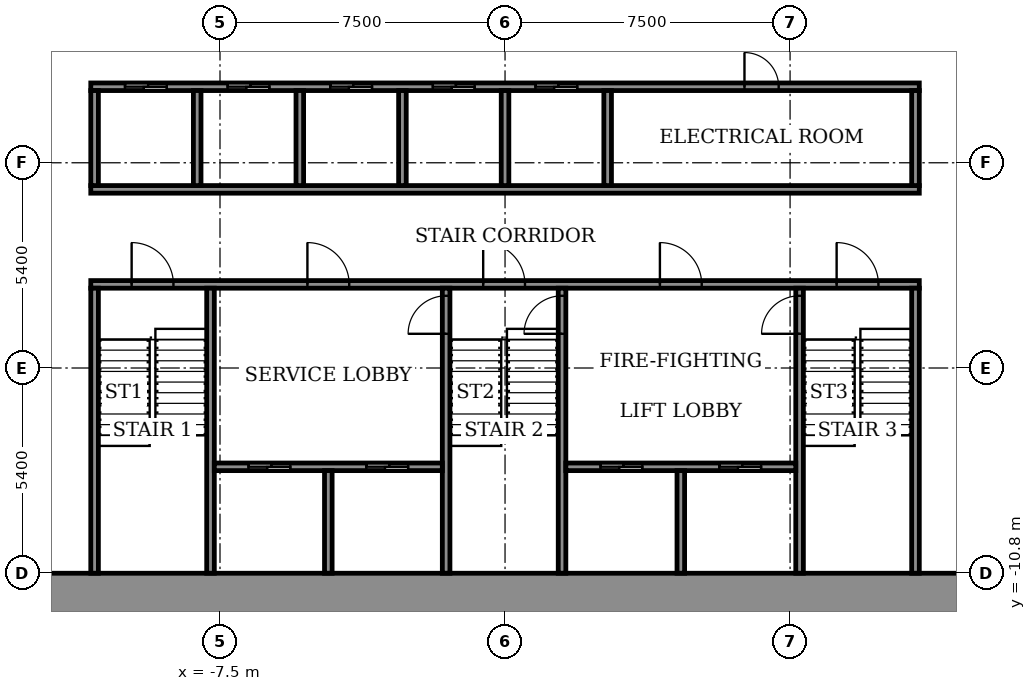
"""IFC4 building model, lengths in metres.
Left out: names, types, materials, properties, quantities, classifications, styles, units other than length and angle.
Written with IfcOpenShell. Run it as: python <this file> out.ifc"""

import sys

from ifc_helpers import new_model, si_unit, direction, frame, frame_2d, origin, place, context, subcontext, project, spatial, rectangle, extrude, element, fill, save


model = new_model("IFC4")
c1 = context("Model", 3, precision=1e-05, world=origin(), true_north=direction((0.0, 1.0)))
c2 = subcontext(c1, "Body", "Model", "MODEL_VIEW")
j1 = project(units=[si_unit("LENGTHUNIT", "METRE"), si_unit("PLANEANGLEUNIT", "RADIAN")], contexts=[c1])
p1 = place(None, origin())
s1 = spatial("IfcSite", under=j1, at=p1, CompositionType="ELEMENT")
p2 = place(p1, origin())
s2 = spatial("IfcBuilding", under=s1, at=p2, CompositionType="ELEMENT")
p3 = place(p2, frame((0.0, 0.0, 48.5)))
s3 = spatial("IfcBuildingStorey", under=s2, at=p3, CompositionType="ELEMENT", Elevation=48.5)
p4 = place(p3, frame((-14.9, -11.35, 0.0), z_axis=(0.0, 0.0, 1.0), x_axis=(1.0, 0.0, 0.0)))
e1 = element("IfcWall", 1, at=p4, inside=s3, PredefinedType="SHEAR", context=c2, shape_type="SweptSolid", body=[
    extrude(rectangle(XDim=29.8, YDim=1.1, at=frame_2d((14.9, 0.0))), origin(), (0.0, 0.0, 1.0), 3.6),
])
p5 = place(p3, frame((-10.9, -3.2, 0.0), z_axis=(0.0, 0.0, 1.0), x_axis=(1.0, 0.0, 0.0)))
e2 = element("IfcWall", 2, at=p5, inside=s3, PredefinedType="SHEAR", context=c2, shape_type="SweptSolid", body=[
    extrude(rectangle(XDim=21.8, YDim=0.2, at=frame_2d((10.9, 0.0))), origin(), (0.0, 0.0, 1.0), 3.05),
])
p6 = place(p5, frame((1.075, 0.0, 0.0)))
e3 = element("IfcOpeningElement", 3, at=p6, cuts=e2, PredefinedType="OPENING", context=c2, shape_type="SweptSolid", body=[
    extrude(rectangle(XDim=1.1, YDim=2.1, at=frame_2d((0.55, 1.05))), frame((0.0, 0.11, 0.0), z_axis=(0.0, -1.0, 0.0), x_axis=(1.0, 0.0, 0.0)), (0.0, 0.0, 1.0), 0.22),
])
p7 = place(p5, frame((10.325, 0.0, 0.0)))
e4 = element("IfcOpeningElement", 4, at=p7, cuts=e2, PredefinedType="OPENING", context=c2, shape_type="SweptSolid", body=[
    extrude(rectangle(XDim=1.1, YDim=2.1, at=frame_2d((0.55, 1.05))), frame((0.0, 0.11, 0.0), z_axis=(0.0, -1.0, 0.0), x_axis=(1.0, 0.0, 0.0)), (0.0, 0.0, 1.0), 0.22),
])
p8 = place(p5, frame((19.625, 0.0, 0.0)))
e5 = element("IfcOpeningElement", 5, at=p8, cuts=e2, PredefinedType="OPENING", context=c2, shape_type="SweptSolid", body=[
    extrude(rectangle(XDim=1.1, YDim=2.1, at=frame_2d((0.55, 1.05))), frame((0.0, 0.11, 0.0), z_axis=(0.0, -1.0, 0.0), x_axis=(1.0, 0.0, 0.0)), (0.0, 0.0, 1.0), 0.22),
])
p9 = place(p5, frame((5.7, 0.0, 0.0)))
e6 = element("IfcOpeningElement", 6, at=p9, cuts=e2, PredefinedType="OPENING", context=c2, shape_type="SweptSolid", body=[
    extrude(rectangle(XDim=1.1, YDim=2.1, at=frame_2d((0.55, 1.05))), frame((0.0, 0.11, 0.0), z_axis=(0.0, -1.0, 0.0), x_axis=(1.0, 0.0, 0.0)), (0.0, 0.0, 1.0), 0.22),
])
p10 = place(p5, frame((14.975, 0.0, 0.0)))
e7 = element("IfcOpeningElement", 7, at=p10, cuts=e2, PredefinedType="OPENING", context=c2, shape_type="SweptSolid", body=[
    extrude(rectangle(XDim=1.1, YDim=2.1, at=frame_2d((0.55, 1.05))), frame((0.0, 0.11, 0.0), z_axis=(0.0, -1.0, 0.0), x_axis=(1.0, 0.0, 0.0)), (0.0, 0.0, 1.0), 0.22),
])
p11 = place(p3, frame((-10.9, -0.7, 0.0), z_axis=(0.0, 0.0, 1.0), x_axis=(1.0, 0.0, 0.0)))
e8 = element("IfcWall", 8, at=p11, inside=s3, PredefinedType="SHEAR", context=c2, shape_type="SweptSolid", body=[
    extrude(rectangle(XDim=21.8, YDim=0.2, at=frame_2d((10.9, 0.0))), origin(), (0.0, 0.0, 1.0), 3.05),
])
p12 = place(p3, frame((-10.9, 2.0, 0.0), z_axis=(0.0, 0.0, 1.0), x_axis=(1.0, 0.0, 0.0)))
e9 = element("IfcWall", 9, at=p12, inside=s3, PredefinedType="SHEAR", context=c2, shape_type="SweptSolid", body=[
    extrude(rectangle(XDim=21.8, YDim=0.2, at=frame_2d((10.9, 0.0))), origin(), (0.0, 0.0, 1.0), 3.05),
])
p13 = place(p12, frame((0.9, 0.0, 0.0)))
e10 = element("IfcOpeningElement", 10, at=p13, cuts=e9, PredefinedType="OPENING", context=c2, shape_type="SweptSolid", body=[
    extrude(rectangle(XDim=1.1, YDim=2.1, at=frame_2d((0.55, 1.05))), frame((0.0, 0.11, 0.0), z_axis=(0.0, -1.0, 0.0), x_axis=(1.0, 0.0, 0.0)), (0.0, 0.0, 1.0), 0.22),
])
p14 = place(p12, frame((3.6, 0.0, 0.0)))
e11 = element("IfcOpeningElement", 11, at=p14, cuts=e9, PredefinedType="OPENING", context=c2, shape_type="SweptSolid", body=[
    extrude(rectangle(XDim=1.1, YDim=2.1, at=frame_2d((0.55, 1.05))), frame((0.0, 0.11, 0.0), z_axis=(0.0, -1.0, 0.0), x_axis=(1.0, 0.0, 0.0)), (0.0, 0.0, 1.0), 0.22),
])
p15 = place(p12, frame((6.3, 0.0, 0.0)))
e12 = element("IfcOpeningElement", 12, at=p15, cuts=e9, PredefinedType="OPENING", context=c2, shape_type="SweptSolid", body=[
    extrude(rectangle(XDim=1.1, YDim=2.1, at=frame_2d((0.55, 1.05))), frame((0.0, 0.11, 0.0), z_axis=(0.0, -1.0, 0.0), x_axis=(1.0, 0.0, 0.0)), (0.0, 0.0, 1.0), 0.22),
])
p16 = place(p12, frame((9.0, 0.0, 0.0)))
e13 = element("IfcOpeningElement", 13, at=p16, cuts=e9, PredefinedType="OPENING", context=c2, shape_type="SweptSolid", body=[
    extrude(rectangle(XDim=1.1, YDim=2.1, at=frame_2d((0.55, 1.05))), frame((0.0, 0.11, 0.0), z_axis=(0.0, -1.0, 0.0), x_axis=(1.0, 0.0, 0.0)), (0.0, 0.0, 1.0), 0.22),
])
p17 = place(p12, frame((11.7, 0.0, 0.0)))
e14 = element("IfcOpeningElement", 14, at=p17, cuts=e9, PredefinedType="OPENING", context=c2, shape_type="SweptSolid", body=[
    extrude(rectangle(XDim=1.1, YDim=2.1, at=frame_2d((0.55, 1.05))), frame((0.0, 0.11, 0.0), z_axis=(0.0, -1.0, 0.0), x_axis=(1.0, 0.0, 0.0)), (0.0, 0.0, 1.0), 0.22),
])
p18 = place(p12, frame((17.2, 0.0, 0.0)))
e15 = element("IfcOpeningElement", 15, at=p18, cuts=e9, PredefinedType="OPENING", context=c2, shape_type="SweptSolid", body=[
    extrude(rectangle(XDim=0.9, YDim=2.1, at=frame_2d((0.45, 1.05))), frame((0.0, 0.11, 0.0), z_axis=(0.0, -1.0, 0.0), x_axis=(1.0, 0.0, 0.0)), (0.0, 0.0, 1.0), 0.22),
])
for number, where, z_axis, x_axis in (
    (16, (-10.8, -10.8, 0.0), (0.0, 0.0, 1.0), (0.0, 1.0, 0.0)),
    (17, (-7.75, -10.8, 0.0), (0.0, 0.0, 1.0), (0.0, 1.0, 0.0)),
):
    element("IfcWall", number, at=place(p3, frame(where, z_axis=z_axis, x_axis=x_axis)), inside=s3, PredefinedType="SHEAR", context=c2, shape_type="SweptSolid", body=[
        extrude(rectangle(XDim=7.5, YDim=0.2, at=frame_2d((3.75, 0.0))), origin(), (0.0, 0.0, 1.0), 3.05),
    ])
p19 = place(p3, frame((-1.55, -10.8, 0.0), z_axis=(0.0, 0.0, 1.0), x_axis=(0.0, 1.0, 0.0)))
e18 = element("IfcWall", 18, at=p19, inside=s3, PredefinedType="SHEAR", context=c2, shape_type="SweptSolid", body=[
    extrude(rectangle(XDim=7.5, YDim=0.2, at=frame_2d((3.75, 0.0))), origin(), (0.0, 0.0, 1.0), 3.05),
])
p20 = place(p19, frame((6.3, 0.0, 0.0)))
e19 = element("IfcOpeningElement", 19, at=p20, cuts=e18, PredefinedType="OPENING", context=c2, shape_type="SweptSolid", body=[
    extrude(rectangle(XDim=1.0, YDim=2.1, at=frame_2d((0.5, 1.05))), frame((0.0, 0.11, 0.0), z_axis=(0.0, -1.0, 0.0), x_axis=(1.0, 0.0, 0.0)), (0.0, 0.0, 1.0), 0.22),
])
p21 = place(p3, frame((1.5, -10.8, 0.0), z_axis=(0.0, 0.0, 1.0), x_axis=(0.0, 1.0, 0.0)))
e20 = element("IfcWall", 20, at=p21, inside=s3, PredefinedType="SHEAR", context=c2, shape_type="SweptSolid", body=[
    extrude(rectangle(XDim=7.5, YDim=0.2, at=frame_2d((3.75, 0.0))), origin(), (0.0, 0.0, 1.0), 3.05),
])
p22 = place(p21, frame((6.3, 0.0, 0.0)))
e21 = element("IfcOpeningElement", 21, at=p22, cuts=e20, PredefinedType="OPENING", context=c2, shape_type="SweptSolid", body=[
    extrude(rectangle(XDim=1.0, YDim=2.1, at=frame_2d((0.5, 1.05))), frame((0.0, 0.11, 0.0), z_axis=(0.0, -1.0, 0.0), x_axis=(1.0, 0.0, 0.0)), (0.0, 0.0, 1.0), 0.22),
])
p23 = place(p3, frame((7.75, -10.8, 0.0), z_axis=(0.0, 0.0, 1.0), x_axis=(0.0, 1.0, 0.0)))
e22 = element("IfcWall", 22, at=p23, inside=s3, PredefinedType="SHEAR", context=c2, shape_type="SweptSolid", body=[
    extrude(rectangle(XDim=7.5, YDim=0.2, at=frame_2d((3.75, 0.0))), origin(), (0.0, 0.0, 1.0), 3.05),
])
p24 = place(p23, frame((6.3, 0.0, 0.0)))
e23 = element("IfcOpeningElement", 23, at=p24, cuts=e22, PredefinedType="OPENING", context=c2, shape_type="SweptSolid", body=[
    extrude(rectangle(XDim=1.0, YDim=2.1, at=frame_2d((0.5, 1.05))), frame((0.0, 0.11, 0.0), z_axis=(0.0, -1.0, 0.0), x_axis=(1.0, 0.0, 0.0)), (0.0, 0.0, 1.0), 0.22),
])
p25 = place(p3, frame((10.8, -10.8, 0.0), z_axis=(0.0, 0.0, 1.0), x_axis=(0.0, 1.0, 0.0)))
e24 = element("IfcWall", 24, at=p25, inside=s3, PredefinedType="SHEAR", context=c2, shape_type="SweptSolid", body=[
    extrude(rectangle(XDim=7.5, YDim=0.2, at=frame_2d((3.75, 0.0))), origin(), (0.0, 0.0, 1.0), 3.05),
])
p26 = place(p3, frame((-7.65, -8.0, 0.0), z_axis=(0.0, 0.0, 1.0), x_axis=(1.0, 0.0, 0.0)))
e25 = element("IfcWall", 25, at=p26, inside=s3, PredefinedType="SHEAR", context=c2, shape_type="SweptSolid", body=[
    extrude(rectangle(XDim=6.0, YDim=0.2, at=frame_2d((3.0, 0.0))), origin(), (0.0, 0.0, 1.0), 3.05),
])
p27 = place(p26, frame((0.9, 0.0, 0.0)))
e26 = element("IfcOpeningElement", 26, at=p27, cuts=e25, PredefinedType="OPENING", context=c2, shape_type="SweptSolid", body=[
    extrude(rectangle(XDim=1.1, YDim=2.1, at=frame_2d((0.55, 1.05))), frame((0.0, 0.11, 0.0), z_axis=(0.0, -1.0, 0.0), x_axis=(1.0, 0.0, 0.0)), (0.0, 0.0, 1.0), 0.22),
])
p28 = place(p26, frame((4.0, 0.0, 0.0)))
e27 = element("IfcOpeningElement", 27, at=p28, cuts=e25, PredefinedType="OPENING", context=c2, shape_type="SweptSolid", body=[
    extrude(rectangle(XDim=1.1, YDim=2.1, at=frame_2d((0.55, 1.05))), frame((0.0, 0.11, 0.0), z_axis=(0.0, -1.0, 0.0), x_axis=(1.0, 0.0, 0.0)), (0.0, 0.0, 1.0), 0.22),
])
p29 = place(p3, frame((-4.65, -10.8, 0.0), z_axis=(0.0, 0.0, 1.0), x_axis=(0.0, 1.0, 0.0)))
e28 = element("IfcWall", 28, at=p29, inside=s3, PredefinedType="SHEAR", context=c2, shape_type="SweptSolid", body=[
    extrude(rectangle(XDim=2.7, YDim=0.2, at=frame_2d((1.35, 0.0))), origin(), (0.0, 0.0, 1.0), 3.05),
])
p30 = place(p3, frame((1.6, -8.0, 0.0), z_axis=(0.0, 0.0, 1.0), x_axis=(1.0, 0.0, 0.0)))
e29 = element("IfcWall", 29, at=p30, inside=s3, PredefinedType="SHEAR", context=c2, shape_type="SweptSolid", body=[
    extrude(rectangle(XDim=6.05, YDim=0.2, at=frame_2d((3.025, 0.0))), origin(), (0.0, 0.0, 1.0), 3.05),
])
p31 = place(p30, frame((0.913, 0.0, 0.0)))
e30 = element("IfcOpeningElement", 30, at=p31, cuts=e29, PredefinedType="OPENING", context=c2, shape_type="SweptSolid", body=[
    extrude(rectangle(XDim=1.1, YDim=2.1, at=frame_2d((0.55, 1.05))), frame((0.0, 0.11, 0.0), z_axis=(0.0, -1.0, 0.0), x_axis=(1.0, 0.0, 0.0)), (0.0, 0.0, 1.0), 0.22),
])
p32 = place(p30, frame((4.038, 0.0, 0.0)))
e31 = element("IfcOpeningElement", 31, at=p32, cuts=e29, PredefinedType="OPENING", context=c2, shape_type="SweptSolid", body=[
    extrude(rectangle(XDim=1.1, YDim=2.1, at=frame_2d((0.55, 1.05))), frame((0.0, 0.11, 0.0), z_axis=(0.0, -1.0, 0.0), x_axis=(1.0, 0.0, 0.0)), (0.0, 0.0, 1.0), 0.22),
])
p33 = place(p3, frame((4.625, -10.8, 0.0), z_axis=(0.0, 0.0, 1.0), x_axis=(0.0, 1.0, 0.0)))
e32 = element("IfcWall", 32, at=p33, inside=s3, PredefinedType="SHEAR", context=c2, shape_type="SweptSolid", body=[
    extrude(rectangle(XDim=2.7, YDim=0.2, at=frame_2d((1.35, 0.0))), origin(), (0.0, 0.0, 1.0), 3.05),
])
for number, where, z_axis, x_axis in (
    (33, (-10.8, -0.6, 0.0), (0.0, 0.0, 1.0), (0.0, 1.0, 0.0)),
    (34, (-8.1, -0.6, 0.0), (0.0, 0.0, 1.0), (0.0, 1.0, 0.0)),
    (35, (-5.4, -0.6, 0.0), (0.0, 0.0, 1.0), (0.0, 1.0, 0.0)),
    (36, (-2.7, -0.6, 0.0), (0.0, 0.0, 1.0), (0.0, 1.0, 0.0)),
    (37, (0.0, -0.6, 0.0), (0.0, 0.0, 1.0), (0.0, 1.0, 0.0)),
    (38, (2.7, -0.6, 0.0), (0.0, 0.0, 1.0), (0.0, 1.0, 0.0)),
):
    element("IfcWall", number, at=place(p3, frame(where, z_axis=z_axis, x_axis=x_axis)), inside=s3, PredefinedType="SHEAR", context=c2, shape_type="SweptSolid", body=[
        extrude(rectangle(XDim=2.5, YDim=0.2, at=frame_2d((1.25, 0.0))), origin(), (0.0, 0.0, 1.0), 3.05),
    ])
p34 = place(p3, frame((10.8, -0.6, 0.0), z_axis=(0.0, 0.0, 1.0), x_axis=(0.0, 1.0, 0.0)))
e39 = element("IfcWall", 39, at=p34, inside=s3, PredefinedType="STANDARD", context=c2, shape_type="SweptSolid", body=[
    extrude(rectangle(XDim=2.5, YDim=0.2, at=frame_2d((1.25, 0.0))), origin(), (0.0, 0.0, 1.0), 3.05),
])
p35 = place(p13, origin())
e40 = element("IfcDoor", 40, at=p35, inside=s3, OperationType="SLIDING_TO_LEFT", PredefinedType="DOOR", context=c2, shape_type="SweptSolid", body=[
    extrude(rectangle(XDim=1.1, YDim=2.1, at=frame_2d((0.55, 1.05))), frame((0.0, 0.025, 0.0), z_axis=(0.0, -1.0, 0.0), x_axis=(1.0, 0.0, 0.0)), (0.0, 0.0, 1.0), 0.05),
])
fill(e10, e40)
p36 = place(p14, origin())
e41 = element("IfcDoor", 41, at=p36, inside=s3, OperationType="SLIDING_TO_LEFT", PredefinedType="DOOR", context=c2, shape_type="SweptSolid", body=[
    extrude(rectangle(XDim=1.1, YDim=2.1, at=frame_2d((0.55, 1.05))), frame((0.0, 0.025, 0.0), z_axis=(0.0, -1.0, 0.0), x_axis=(1.0, 0.0, 0.0)), (0.0, 0.0, 1.0), 0.05),
])
fill(e11, e41)
p37 = place(p15, origin())
e42 = element("IfcDoor", 42, at=p37, inside=s3, OperationType="SLIDING_TO_LEFT", PredefinedType="DOOR", context=c2, shape_type="SweptSolid", body=[
    extrude(rectangle(XDim=1.1, YDim=2.1, at=frame_2d((0.55, 1.05))), frame((0.0, 0.025, 0.0), z_axis=(0.0, -1.0, 0.0), x_axis=(1.0, 0.0, 0.0)), (0.0, 0.0, 1.0), 0.05),
])
fill(e12, e42)
p38 = place(p16, origin())
e43 = element("IfcDoor", 43, at=p38, inside=s3, OperationType="SLIDING_TO_LEFT", PredefinedType="DOOR", context=c2, shape_type="SweptSolid", body=[
    extrude(rectangle(XDim=1.1, YDim=2.1, at=frame_2d((0.55, 1.05))), frame((0.0, 0.025, 0.0), z_axis=(0.0, -1.0, 0.0), x_axis=(1.0, 0.0, 0.0)), (0.0, 0.0, 1.0), 0.05),
])
fill(e13, e43)
p39 = place(p17, origin())
e44 = element("IfcDoor", 44, at=p39, inside=s3, OperationType="SLIDING_TO_LEFT", PredefinedType="DOOR", context=c2, shape_type="SweptSolid", body=[
    extrude(rectangle(XDim=1.1, YDim=2.1, at=frame_2d((0.55, 1.05))), frame((0.0, 0.025, 0.0), z_axis=(0.0, -1.0, 0.0), x_axis=(1.0, 0.0, 0.0)), (0.0, 0.0, 1.0), 0.05),
])
fill(e14, e44)
p40 = place(p18, origin())
e45 = element("IfcDoor", 45, at=p40, inside=s3, OperationType="SINGLE_SWING_LEFT", PredefinedType="DOOR", context=c2, shape_type="SweptSolid", body=[
    extrude(rectangle(XDim=0.9, YDim=2.1, at=frame_2d((0.45, 1.05))), frame((0.0, 0.025, 0.0), z_axis=(0.0, -1.0, 0.0), x_axis=(1.0, 0.0, 0.0)), (0.0, 0.0, 1.0), 0.05),
])
fill(e15, e45)
p41 = place(p31, origin())
e46 = element("IfcDoor", 46, at=p41, inside=s3, OperationType="SLIDING_TO_LEFT", PredefinedType="DOOR", context=c2, shape_type="SweptSolid", body=[
    extrude(rectangle(XDim=1.1, YDim=2.1, at=frame_2d((0.55, 1.05))), frame((0.0, 0.025, 0.0), z_axis=(0.0, -1.0, 0.0), x_axis=(1.0, 0.0, 0.0)), (0.0, 0.0, 1.0), 0.05),
])
fill(e30, e46)
p42 = place(p27, origin())
e47 = element("IfcDoor", 47, at=p42, inside=s3, OperationType="SLIDING_TO_LEFT", PredefinedType="DOOR", context=c2, shape_type="SweptSolid", body=[
    extrude(rectangle(XDim=1.1, YDim=2.1, at=frame_2d((0.55, 1.05))), frame((0.0, 0.025, 0.0), z_axis=(0.0, -1.0, 0.0), x_axis=(1.0, 0.0, 0.0)), (0.0, 0.0, 1.0), 0.05),
])
fill(e26, e47)
p43 = place(p32, origin())
e48 = element("IfcDoor", 48, at=p43, inside=s3, OperationType="SLIDING_TO_LEFT", PredefinedType="DOOR", context=c2, shape_type="SweptSolid", body=[
    extrude(rectangle(XDim=1.1, YDim=2.1, at=frame_2d((0.55, 1.05))), frame((0.0, 0.025, 0.0), z_axis=(0.0, -1.0, 0.0), x_axis=(1.0, 0.0, 0.0)), (0.0, 0.0, 1.0), 0.05),
])
fill(e31, e48)
p44 = place(p28, origin())
e49 = element("IfcDoor", 49, at=p44, inside=s3, OperationType="SLIDING_TO_LEFT", PredefinedType="DOOR", context=c2, shape_type="SweptSolid", body=[
    extrude(rectangle(XDim=1.1, YDim=2.1, at=frame_2d((0.55, 1.05))), frame((0.0, 0.025, 0.0), z_axis=(0.0, -1.0, 0.0), x_axis=(1.0, 0.0, 0.0)), (0.0, 0.0, 1.0), 0.05),
])
fill(e27, e49)
p45 = place(p6, origin())
e50 = element("IfcDoor", 50, at=p45, inside=s3, OperationType="SINGLE_SWING_RIGHT", PredefinedType="DOOR", context=c2, shape_type="SweptSolid", body=[
    extrude(rectangle(XDim=1.1, YDim=2.1, at=frame_2d((0.55, 1.05))), frame((0.0, 0.025, 0.0), z_axis=(0.0, -1.0, 0.0), x_axis=(1.0, 0.0, 0.0)), (0.0, 0.0, 1.0), 0.05),
])
fill(e3, e50)
p46 = place(p7, origin())
e51 = element("IfcDoor", 51, at=p46, inside=s3, OperationType="SINGLE_SWING_RIGHT", PredefinedType="DOOR", context=c2, shape_type="SweptSolid", body=[
    extrude(rectangle(XDim=1.1, YDim=2.1, at=frame_2d((0.55, 1.05))), frame((0.0, 0.025, 0.0), z_axis=(0.0, -1.0, 0.0), x_axis=(1.0, 0.0, 0.0)), (0.0, 0.0, 1.0), 0.05),
])
fill(e4, e51)
p47 = place(p8, origin())
e52 = element("IfcDoor", 52, at=p47, inside=s3, OperationType="SINGLE_SWING_RIGHT", PredefinedType="DOOR", context=c2, shape_type="SweptSolid", body=[
    extrude(rectangle(XDim=1.1, YDim=2.1, at=frame_2d((0.55, 1.05))), frame((0.0, 0.025, 0.0), z_axis=(0.0, -1.0, 0.0), x_axis=(1.0, 0.0, 0.0)), (0.0, 0.0, 1.0), 0.05),
])
fill(e5, e52)
p48 = place(p9, origin())
e53 = element("IfcDoor", 53, at=p48, inside=s3, OperationType="SINGLE_SWING_LEFT", PredefinedType="DOOR", context=c2, shape_type="SweptSolid", body=[
    extrude(rectangle(XDim=1.1, YDim=2.1, at=frame_2d((0.55, 1.05))), frame((0.0, 0.025, 0.0), z_axis=(0.0, -1.0, 0.0), x_axis=(1.0, 0.0, 0.0)), (0.0, 0.0, 1.0), 0.05),
])
fill(e6, e53)
p49 = place(p10, origin())
e54 = element("IfcDoor", 54, at=p49, inside=s3, OperationType="SINGLE_SWING_LEFT", PredefinedType="DOOR", context=c2, shape_type="SweptSolid", body=[
    extrude(rectangle(XDim=1.1, YDim=2.1, at=frame_2d((0.55, 1.05))), frame((0.0, 0.025, 0.0), z_axis=(0.0, -1.0, 0.0), x_axis=(1.0, 0.0, 0.0)), (0.0, 0.0, 1.0), 0.05),
])
fill(e7, e54)
p50 = place(p20, origin())
e55 = element("IfcDoor", 55, at=p50, inside=s3, OperationType="SINGLE_SWING_RIGHT", PredefinedType="DOOR", context=c2, shape_type="SweptSolid", body=[
    extrude(rectangle(XDim=1.0, YDim=2.1, at=frame_2d((0.5, 1.05))), frame((0.0, 0.025, 0.0), z_axis=(0.0, -1.0, 0.0), x_axis=(1.0, 0.0, 0.0)), (0.0, 0.0, 1.0), 0.05),
])
fill(e19, e55)
p51 = place(p22, origin())
e56 = element("IfcDoor", 56, at=p51, inside=s3, OperationType="SINGLE_SWING_RIGHT", PredefinedType="DOOR", context=c2, shape_type="SweptSolid", body=[
    extrude(rectangle(XDim=1.0, YDim=2.1, at=frame_2d((0.5, 1.05))), frame((0.0, 0.025, 0.0), z_axis=(0.0, -1.0, 0.0), x_axis=(1.0, 0.0, 0.0)), (0.0, 0.0, 1.0), 0.05),
])
fill(e21, e56)
p52 = place(p24, origin())
e57 = element("IfcDoor", 57, at=p52, inside=s3, OperationType="SINGLE_SWING_RIGHT", PredefinedType="DOOR", context=c2, shape_type="SweptSolid", body=[
    extrude(rectangle(XDim=1.0, YDim=2.1, at=frame_2d((0.5, 1.05))), frame((0.0, 0.025, 0.0), z_axis=(0.0, -1.0, 0.0), x_axis=(1.0, 0.0, 0.0)), (0.0, 0.0, 1.0), 0.05),
])
fill(e23, e57)
save(model, sys.argv[1])
